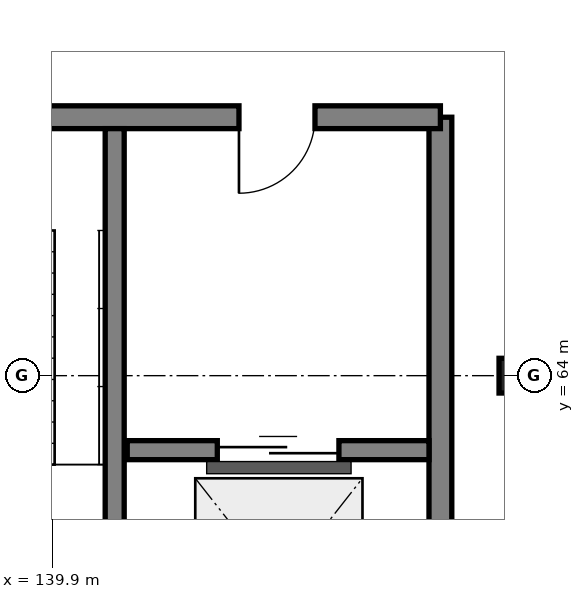
"""IFC4 building model, lengths in metres.
Left out: names, types, materials, properties, quantities, classifications, styles, units other than length and angle.
Written with IfcOpenShell. Run it as: python <this file> out.ifc"""

import sys

from ifc_helpers import new_model, si_unit, direction, frame, frame_2d, origin, origin_2d_with_axis, place, context, subcontext, project, spatial, rectangle, hollow_circle, extrude, element, fill, save


model = new_model("IFC4")
c1 = context("Model", 3, precision=1e-05, world=origin(), true_north=direction((0.0, 1.0)))
c2 = subcontext(c1, "Body", "Model", "MODEL_VIEW")
j1 = project(units=[si_unit("LENGTHUNIT", "METRE"), si_unit("PLANEANGLEUNIT", "RADIAN")], contexts=[c1])
p1 = place(None, origin())
s1 = spatial("IfcSite", under=j1, at=p1, CompositionType="ELEMENT")
p2 = place(p1, origin())
s2 = spatial("IfcBuilding", under=s1, at=p2, CompositionType="ELEMENT")
p3 = place(p2, frame((0.0, 0.0, -4.5)))
s3 = spatial("IfcBuildingStorey", under=s2, at=p3, CompositionType="ELEMENT", Elevation=-4.5)
p4 = place(p3, frame((146.0, 64.0, -0.45), z_axis=(0.0, 0.0, 1.0), x_axis=(1.0, 0.0, 0.0)))
e1 = element("IfcColumn", 1, at=p4, inside=s3, PredefinedType="COLUMN", context=c2, shape_type="SweptSolid", body=[
    extrude(hollow_circle(Radius=0.229, WallThickness=0.013, at=origin_2d_with_axis()), origin(), (0.0, 0.0, 1.0), 4.95),
])
p5 = place(p3, frame((145.0, 59.4, 0.0), z_axis=(0.0, 0.0, 1.0), x_axis=(0.0, 1.0, 0.0)))
e2 = element("IfcWall", 2, at=p5, inside=s3, PredefinedType="SHEAR", context=c2, shape_type="SweptSolid", body=[
    extrude(rectangle(XDim=8.0, YDim=0.3, at=frame_2d((4.0, 0.0), x_axis=(1.0, 0.0))), origin(), (0.0, 0.0, 1.0), 4.5),
])
p6 = place(p3, frame((145.0, 67.4, 0.0), z_axis=(0.0, 0.0, 1.0), x_axis=(-1.0, 0.0, 0.0)))
e3 = element("IfcWall", 3, at=p6, inside=s3, PredefinedType="SHEAR", context=c2, shape_type="SweptSolid", body=[
    extrude(rectangle(XDim=7.4, YDim=0.3, at=frame_2d((3.7, 0.0), x_axis=(1.0, 0.0))), origin(), (0.0, 0.0, 1.0), 4.5),
])
p7 = place(p6, frame((1.65, 0.0, 0.0)))
e4 = element("IfcOpeningElement", 4, at=p7, cuts=e3, PredefinedType="OPENING", context=c2, shape_type="SweptSolid", body=[
    extrude(rectangle(XDim=1.0, YDim=2.15, at=frame_2d((0.5, 1.075), x_axis=(1.0, 0.0))), frame((0.0, 0.16, 0.0), z_axis=(0.0, -1.0, 0.0), x_axis=(1.0, 0.0, 0.0)), (0.0, 0.0, 1.0), 0.32),
])
p8 = place(p6, frame((5.3, 0.0, 0.0)))
e5 = element("IfcOpeningElement", 5, at=p8, cuts=e3, PredefinedType="OPENING", context=c2, shape_type="SweptSolid", body=[
    extrude(rectangle(XDim=1.0, YDim=2.15, at=frame_2d((0.5, 1.075), x_axis=(1.0, 0.0))), frame((0.0, 0.16, 0.0), z_axis=(0.0, -1.0, 0.0), x_axis=(1.0, 0.0, 0.0)), (0.0, 0.0, 1.0), 0.32),
])
p9 = place(p3, frame((140.715, 59.55, 0.0), z_axis=(0.0, 0.0, 1.0), x_axis=(0.0, 1.0, 0.0)))
e6 = element("IfcWall", 6, at=p9, inside=s3, PredefinedType="SHEAR", context=c2, shape_type="SweptSolid", body=[
    extrude(rectangle(XDim=7.7, YDim=0.25, at=frame_2d((3.85, 0.0), x_axis=(1.0, 0.0))), origin(), (0.0, 0.0, 1.0), 4.5),
])
p10 = place(p3, frame((140.88, 63.02, 0.0), z_axis=(0.0, 0.0, 1.0), x_axis=(1.0, 0.0, 0.0)))
e7 = element("IfcWall", 7, at=p10, inside=s3, PredefinedType="SHEAR", context=c2, shape_type="SweptSolid", body=[
    extrude(rectangle(XDim=3.97, YDim=0.25, at=frame_2d((1.985, 0.0), x_axis=(1.0, 0.0))), origin(), (0.0, 0.0, 1.0), 4.2),
])
p11 = place(p10, frame((1.185, 0.0, 0.0)))
e8 = element("IfcOpeningElement", 8, at=p11, cuts=e7, PredefinedType="OPENING", context=c2, shape_type="SweptSolid", body=[
    extrude(rectangle(XDim=1.6, YDim=2.3, at=frame_2d((0.8, 1.15), x_axis=(1.0, 0.0))), frame((0.0, 0.135, 0.0), z_axis=(0.0, -1.0, 0.0), x_axis=(1.0, 0.0, 0.0)), (0.0, 0.0, 1.0), 0.27),
])
p12 = place(p7, origin())
e9 = element("IfcDoor", 9, at=p12, inside=s3, OperationType="SINGLE_SWING_RIGHT", PredefinedType="DOOR", context=c2, shape_type="SweptSolid", body=[
    extrude(rectangle(XDim=1.0, YDim=2.15, at=frame_2d((0.5, 1.075), x_axis=(1.0, 0.0))), frame((0.0, 0.025, 0.0), z_axis=(0.0, -1.0, 0.0), x_axis=(1.0, 0.0, 0.0)), (0.0, 0.0, 1.0), 0.05),
])
fill(e4, e9)
p13 = place(p11, origin())
e10 = element("IfcDoor", 10, at=p13, inside=s3, OperationType="SLIDING_TO_RIGHT", PredefinedType="DOOR", context=c2, shape_type="SweptSolid", body=[
    extrude(rectangle(XDim=1.6, YDim=2.3, at=frame_2d((0.8, 1.15), x_axis=(1.0, 0.0))), frame((0.0, 0.025, 0.0), z_axis=(0.0, -1.0, 0.0), x_axis=(1.0, 0.0, 0.0)), (0.0, 0.0, 1.0), 0.05),
])
fill(e8, e10)
save(model, sys.argv[1])
